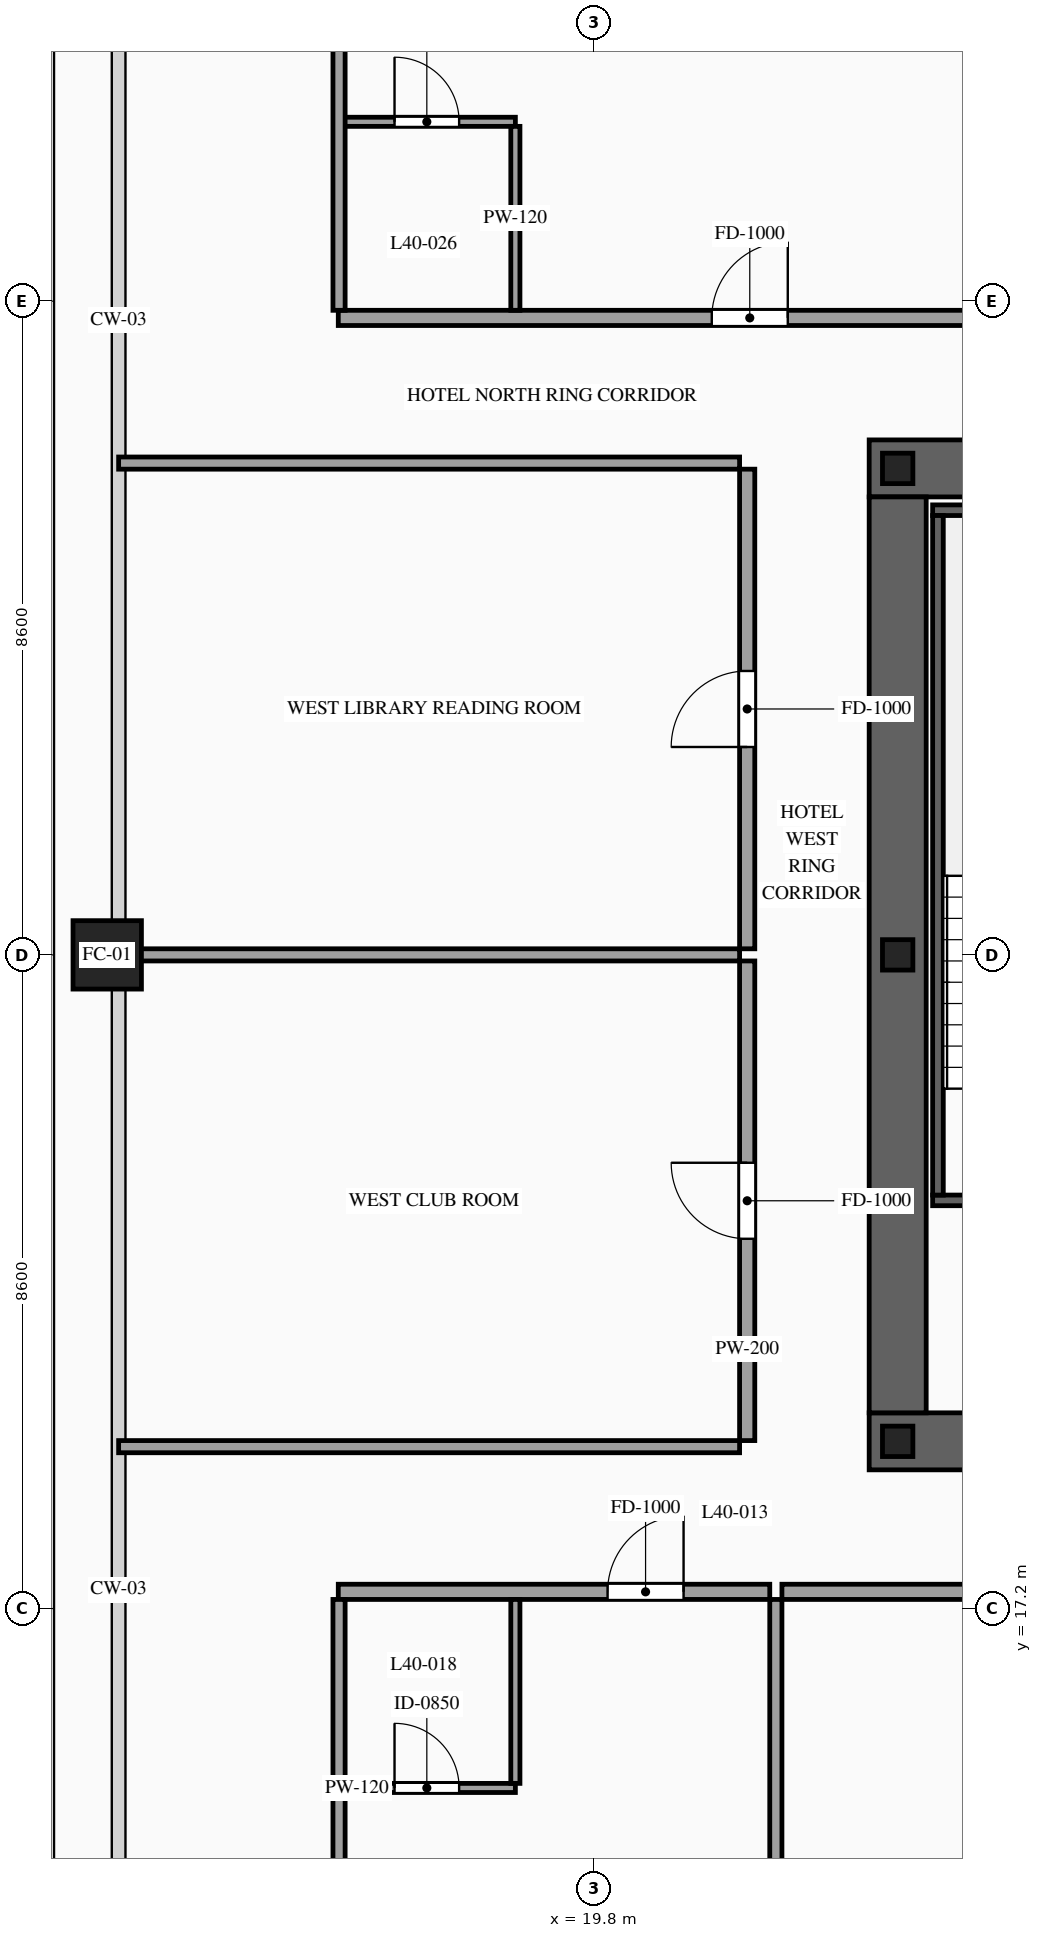
"""IFC4 building model, lengths in metres.
Left out: names, types, materials, properties, quantities, classifications, styles, units other than length and angle.
Written with IfcOpenShell. Run it as: python <this file> out.ifc"""

import sys

from ifc_helpers import new_model, si_unit, direction, frame, frame_2d, origin, origin_2d, place, context, subcontext, project, spatial, rectangle, hollow_rectangle, i_section, extrude, source, transform, mapped, element, fill, save


model = new_model("IFC4")
c1 = context("Model", 3, precision=1e-05, world=origin(), true_north=direction((0.0, 1.0)))
c2 = subcontext(c1, "Body", "Model", "MODEL_VIEW")
j1 = project(units=[si_unit("LENGTHUNIT", "METRE"), si_unit("PLANEANGLEUNIT", "RADIAN")], contexts=[c1])
p1 = place(None, origin())
s1 = spatial("IfcSite", under=j1, at=p1, CompositionType="ELEMENT")
p2 = place(p1, origin())
s2 = spatial("IfcBuilding", under=s1, at=p2, CompositionType="ELEMENT")
p3 = place(p2, frame((0.0, 0.0, 152.4)))
s3 = spatial("IfcBuildingStorey", under=s2, at=p3, CompositionType="ELEMENT", Elevation=152.4)
p4 = place(p3, frame((23.425, 19.4, 0.0), z_axis=(0.0, 0.0, 1.0), x_axis=(1.0, 0.0, 0.0)))
e1 = element("IfcWall", 1, at=p4, inside=s3, PredefinedType="SHEAR", context=c2, shape_type="SweptSolid", body=[
    extrude(rectangle(XDim=27.15, YDim=0.75, at=frame_2d((13.575, 0.0))), origin(), (0.0, 0.0, 1.0), 3.6),
])
p5 = place(p4, frame((2.025, 0.0, 0.0)))
e2 = element("IfcOpeningElement", 2, at=p5, cuts=e1, PredefinedType="OPENING", context=c2, shape_type="SweptSolid", body=[
    extrude(rectangle(XDim=1.1, YDim=2.2, at=frame_2d((0.55, 1.1))), frame((0.0, 0.39, 0.0), z_axis=(0.0, -1.0, 0.0), x_axis=(1.0, 0.0, 0.0)), (0.0, 0.0, 1.0), 0.78),
])
p6 = place(p4, frame((9.925, 0.0, 0.0)))
e3 = element("IfcOpeningElement", 3, at=p6, cuts=e1, PredefinedType="OPENING", context=c2, shape_type="SweptSolid", body=[
    extrude(rectangle(XDim=1.1, YDim=2.2, at=frame_2d((0.55, 1.1))), frame((0.0, 0.39, 0.0), z_axis=(0.0, -1.0, 0.0), x_axis=(1.0, 0.0, 0.0)), (0.0, 0.0, 1.0), 0.78),
])
p7 = place(p4, frame((23.125, 0.0, 0.0)))
e4 = element("IfcOpeningElement", 4, at=p7, cuts=e1, PredefinedType="OPENING", context=c2, shape_type="SweptSolid", body=[
    extrude(rectangle(XDim=1.1, YDim=2.2, at=frame_2d((0.55, 1.1))), frame((0.0, 0.39, 0.0), z_axis=(0.0, -1.0, 0.0), x_axis=(1.0, 0.0, 0.0)), (0.0, 0.0, 1.0), 0.78),
])
p8 = place(p4, frame((19.745, 0.0, 0.0)))
e5 = element("IfcOpeningElement", 5, at=p8, cuts=e1, PredefinedType="OPENING", context=c2, shape_type="SweptSolid", body=[
    extrude(rectangle(XDim=0.9, YDim=2.15, at=frame_2d((0.45, 1.075))), frame((0.0, 0.39, 0.0), z_axis=(0.0, -1.0, 0.0), x_axis=(1.0, 0.0, 0.0)), (0.0, 0.0, 1.0), 0.78),
])
p9 = place(p4, frame((18.305, 0.0, 0.0)))
e6 = element("IfcOpeningElement", 6, at=p9, cuts=e1, PredefinedType="OPENING", context=c2, shape_type="SweptSolid", body=[
    extrude(rectangle(XDim=0.9, YDim=2.15, at=frame_2d((0.45, 1.075))), frame((0.0, 0.39, 0.0), z_axis=(0.0, -1.0, 0.0), x_axis=(1.0, 0.0, 0.0)), (0.0, 0.0, 1.0), 0.78),
])
p10 = place(p3, frame((23.425, 32.2, 0.0), z_axis=(0.0, 0.0, 1.0), x_axis=(1.0, 0.0, 0.0)))
e7 = element("IfcWall", 7, at=p10, inside=s3, PredefinedType="SHEAR", context=c2, shape_type="SweptSolid", body=[
    extrude(rectangle(XDim=27.15, YDim=0.75, at=frame_2d((13.575, 0.0))), origin(), (0.0, 0.0, 1.0), 3.6),
])
p11 = place(p10, frame((4.645, 0.0, 0.0)))
e8 = element("IfcOpeningElement", 8, at=p11, cuts=e7, PredefinedType="OPENING", context=c2, shape_type="SweptSolid", body=[
    extrude(rectangle(XDim=0.9, YDim=2.15, at=frame_2d((0.45, 1.075))), frame((0.0, 0.39, 0.0), z_axis=(0.0, -1.0, 0.0), x_axis=(1.0, 0.0, 0.0)), (0.0, 0.0, 1.0), 0.78),
])
p12 = place(p10, frame((9.925, 0.0, 0.0)))
e9 = element("IfcOpeningElement", 9, at=p12, cuts=e7, PredefinedType="OPENING", context=c2, shape_type="SweptSolid", body=[
    extrude(rectangle(XDim=1.1, YDim=2.2, at=frame_2d((0.55, 1.1))), frame((0.0, 0.39, 0.0), z_axis=(0.0, -1.0, 0.0), x_axis=(1.0, 0.0, 0.0)), (0.0, 0.0, 1.0), 0.78),
])
p13 = place(p10, frame((15.775, 0.0, 0.0)))
e10 = element("IfcOpeningElement", 10, at=p13, cuts=e7, PredefinedType="OPENING", context=c2, shape_type="SweptSolid", body=[
    extrude(rectangle(XDim=1.1, YDim=2.2, at=frame_2d((0.55, 1.1))), frame((0.0, 0.39, 0.0), z_axis=(0.0, -1.0, 0.0), x_axis=(1.0, 0.0, 0.0)), (0.0, 0.0, 1.0), 0.78),
])
p14 = place(p10, frame((19.745, 0.0, 0.0)))
e11 = element("IfcOpeningElement", 11, at=p14, cuts=e7, PredefinedType="OPENING", context=c2, shape_type="SweptSolid", body=[
    extrude(rectangle(XDim=0.9, YDim=2.15, at=frame_2d((0.45, 1.075))), frame((0.0, 0.39, 0.0), z_axis=(0.0, -1.0, 0.0), x_axis=(1.0, 0.0, 0.0)), (0.0, 0.0, 1.0), 0.78),
])
m1 = source(origin(), c2, "Body", "SweptSolid", [
    extrude(rectangle(XDim=12.05, YDim=0.75, at=frame_2d((6.025, 0.0))), origin(), (0.0, 0.0, 1.0), 3.6),
])
p15 = place(p3, frame((23.8, 19.775, 0.0), z_axis=(0.0, 0.0, 1.0), x_axis=(0.0, 1.0, 0.0)))
e12 = element("IfcWall", 12, at=p15, inside=s3, PredefinedType="SHEAR", context=c2, shape_type="MappedRepresentation", body=[
    mapped(m1, transform((0.0, 0.0, 0.0), scale=1.0)),
])
m2 = source(origin(), c2, "Body", "SweptSolid", [
    extrude(i_section(OverallWidth=0.4, OverallDepth=0.4, WebThickness=0.013, FlangeThickness=0.021, at=origin_2d()), origin(), (0.0, 0.0, 1.0), 3.6),
])
for number, where, z_axis, x_axis in (
    (13, (23.8, 19.4, 0.0), (0.0, 0.0, 1.0), (1.0, 0.0, 0.0)),
    (14, (23.8, 25.8, 0.0), (0.0, 0.0, 1.0), (1.0, 0.0, 0.0)),
    (15, (23.8, 32.2, 0.0), (0.0, 0.0, 1.0), (1.0, 0.0, 0.0)),
):
    element("IfcColumn", number, at=place(p3, frame(where, z_axis=z_axis, x_axis=x_axis)), inside=s3, PredefinedType="COLUMN", context=c2, shape_type="MappedRepresentation", body=[
        mapped(m2, transform((0.0, 0.0, 0.0), scale=1.0)),
    ])
m3 = source(origin(), c2, "Body", "SweptSolid", [
    extrude(hollow_rectangle(XDim=0.9, YDim=0.9, WallThickness=0.042, at=origin_2d()), origin(), (0.0, 0.0, 1.0), 3.6),
])
p16 = place(p3, frame((13.4, 25.8, 0.0), z_axis=(0.0, 0.0, 1.0), x_axis=(1.0, 0.0, 0.0)))
e16 = element("IfcColumn", 16, at=p16, inside=s3, PredefinedType="COLUMN", context=c2, shape_type="MappedRepresentation", body=[
    mapped(m3, transform((0.0, 0.0, 0.0), scale=1.0)),
])
p17 = place(p3, frame((24.26, 22.57, 0.0), z_axis=(0.0, 0.0, 1.0), x_axis=(1.0, 0.0, 0.0)))
e17 = element("IfcWall", 17, at=p17, inside=s3, PredefinedType="SOLIDWALL", context=c2, shape_type="SweptSolid", body=[
    extrude(rectangle(XDim=3.28, YDim=0.14, at=frame_2d((1.64, 0.0))), origin(), (0.0, 0.0, 1.0), 3.38),
])
p18 = place(p17, frame((1.09, 0.0, 0.0)))
e18 = element("IfcOpeningElement", 18, at=p18, cuts=e17, PredefinedType="OPENING", context=c2, shape_type="SweptSolid", body=[
    extrude(rectangle(XDim=1.1, YDim=2.2, at=frame_2d((0.55, 1.1))), frame((0.0, 0.085, 0.0), z_axis=(0.0, -1.0, 0.0), x_axis=(1.0, 0.0, 0.0)), (0.0, 0.0, 1.0), 0.17),
])
m4 = source(origin(), c2, "Body", "SweptSolid", [
    extrude(rectangle(XDim=3.28, YDim=0.14, at=frame_2d((1.64, 0.0))), origin(), (0.0, 0.0, 1.0), 3.38),
])
p19 = place(p3, frame((24.26, 31.65, 0.0), z_axis=(0.0, 0.0, 1.0), x_axis=(1.0, 0.0, 0.0)))
e19 = element("IfcWall", 19, at=p19, inside=s3, PredefinedType="SOLIDWALL", context=c2, shape_type="MappedRepresentation", body=[
    mapped(m4, transform((0.0, 0.0, 0.0), scale=1.0)),
])
m5 = source(origin(), c2, "Body", "SweptSolid", [
    extrude(rectangle(XDim=8.94, YDim=0.14, at=frame_2d((4.47, 0.0))), origin(), (0.0, 0.0, 1.0), 3.38),
])
p20 = place(p3, frame((24.33, 22.64, 0.0), z_axis=(0.0, 0.0, 1.0), x_axis=(0.0, 1.0, 0.0)))
e20 = element("IfcWall", 20, at=p20, inside=s3, PredefinedType="SOLIDWALL", context=c2, shape_type="MappedRepresentation", body=[
    mapped(m5, transform((0.0, 0.0, 0.0), scale=1.0)),
])
p21 = place(p3, frame((16.44, 17.42, 0.0), z_axis=(0.0, 0.0, 1.0), x_axis=(1.0, 0.0, 0.0)))
e21 = element("IfcWall", 21, at=p21, inside=s3, PredefinedType="PARTITIONING", context=c2, shape_type="SweptSolid", body=[
    extrude(rectangle(XDim=5.677, YDim=0.2, at=frame_2d((2.838, 0.0))), origin(), (0.0, 0.0, 1.0), 3.38),
])
p22 = place(p21, frame((3.543, 0.0, 0.0)))
e22 = element("IfcOpeningElement", 22, at=p22, cuts=e21, PredefinedType="OPENING", context=c2, shape_type="SweptSolid", body=[
    extrude(rectangle(XDim=1.0, YDim=2.2, at=frame_2d((0.5, 1.1))), frame((0.0, 0.115, 0.0), z_axis=(0.0, -1.0, 0.0), x_axis=(1.0, 0.0, 0.0)), (0.0, 0.0, 1.0), 0.23),
])
m6 = source(origin(), c2, "Body", "SweptSolid", [
    extrude(rectangle(XDim=14.97, YDim=0.16, at=frame_2d((7.485, 0.0))), origin(), (0.0, 0.0, 1.0), 3.38),
])
p23 = place(p3, frame((22.197, 2.35, 0.0), z_axis=(0.0, 0.0, 1.0), x_axis=(0.0, 1.0, 0.0)))
e23 = element("IfcWall", 23, at=p23, inside=s3, PredefinedType="PARTITIONING", context=c2, shape_type="MappedRepresentation", body=[
    mapped(m6, transform((0.0, 0.0, 0.0), scale=1.0)),
])
p24 = place(p3, frame((16.44, 14.84, 0.0), z_axis=(0.0, 0.0, 1.0), x_axis=(1.0, 0.0, 0.0)))
e24 = element("IfcWall", 24, at=p24, inside=s3, PredefinedType="PARTITIONING", context=c2, shape_type="SweptSolid", body=[
    extrude(rectangle(XDim=2.33, YDim=0.12, at=frame_2d((1.165, 0.0))), origin(), (0.0, 0.0, 1.0), 3.38),
])
p25 = place(p24, frame((0.74, 0.0, 0.0)))
e25 = element("IfcOpeningElement", 25, at=p25, cuts=e24, PredefinedType="OPENING", context=c2, shape_type="SweptSolid", body=[
    extrude(rectangle(XDim=0.85, YDim=2.1, at=frame_2d((0.425, 1.05))), frame((0.0, 0.075, 0.0), z_axis=(0.0, -1.0, 0.0), x_axis=(1.0, 0.0, 0.0)), (0.0, 0.0, 1.0), 0.15),
])
m7 = source(origin(), c2, "Body", "SweptSolid", [
    extrude(rectangle(XDim=2.42, YDim=0.12, at=frame_2d((1.21, 0.0))), origin(), (0.0, 0.0, 1.0), 3.38),
])
p26 = place(p3, frame((18.77, 14.9, 0.0), z_axis=(0.0, 0.0, 1.0), x_axis=(0.0, 1.0, 0.0)))
e26 = element("IfcWall", 26, at=p26, inside=s3, PredefinedType="PARTITIONING", context=c2, shape_type="MappedRepresentation", body=[
    mapped(m7, transform((0.0, 0.0, 0.0), scale=1.0)),
])
p27 = place(p3, frame((22.277, 17.42, 0.0), z_axis=(0.0, 0.0, 1.0), x_axis=(1.0, 0.0, 0.0)))
e27 = element("IfcWall", 27, at=p27, inside=s3, PredefinedType="PARTITIONING", context=c2, shape_type="SweptSolid", body=[
    extrude(rectangle(XDim=8.777, YDim=0.2, at=frame_2d((4.388, 0.0))), origin(), (0.0, 0.0, 1.0), 3.38),
])
p28 = place(p27, frame((3.889, 0.0, 0.0)))
e28 = element("IfcOpeningElement", 28, at=p28, cuts=e27, PredefinedType="OPENING", context=c2, shape_type="SweptSolid", body=[
    extrude(rectangle(XDim=1.0, YDim=2.2, at=frame_2d((0.5, 1.1))), frame((0.0, 0.115, 0.0), z_axis=(0.0, -1.0, 0.0), x_axis=(1.0, 0.0, 0.0)), (0.0, 0.0, 1.0), 0.23),
])
m8 = source(origin(), c2, "Body", "SweptSolid", [
    extrude(rectangle(XDim=14.82, YDim=0.16, at=frame_2d((7.41, 0.0))), origin(), (0.0, 0.0, 1.0), 3.38),
])
p29 = place(p3, frame((16.45, 2.5, 0.0), z_axis=(0.0, 0.0, 1.0), x_axis=(0.0, 1.0, 0.0)))
e29 = element("IfcWall", 29, at=p29, inside=s3, PredefinedType="PARTITIONING", context=c2, shape_type="MappedRepresentation", body=[
    mapped(m8, transform((0.0, 0.0, 0.0), scale=1.0)),
])
p30 = place(p3, frame((16.44, 34.18, 0.0), z_axis=(0.0, 0.0, 1.0), x_axis=(1.0, 0.0, 0.0)))
e30 = element("IfcWall", 30, at=p30, inside=s3, PredefinedType="PARTITIONING", context=c2, shape_type="SweptSolid", body=[
    extrude(rectangle(XDim=8.418, YDim=0.2, at=frame_2d((4.209, 0.0))), origin(), (0.0, 0.0, 1.0), 3.38),
])
p31 = place(p30, frame((4.914, 0.0, 0.0)))
e31 = element("IfcOpeningElement", 31, at=p31, cuts=e30, PredefinedType="OPENING", context=c2, shape_type="SweptSolid", body=[
    extrude(rectangle(XDim=1.0, YDim=2.2, at=frame_2d((0.5, 1.1))), frame((0.0, 0.115, 0.0), z_axis=(0.0, -1.0, 0.0), x_axis=(1.0, 0.0, 0.0)), (0.0, 0.0, 1.0), 0.23),
])
p32 = place(p3, frame((16.44, 36.76, 0.0), z_axis=(0.0, 0.0, 1.0), x_axis=(1.0, 0.0, 0.0)))
e32 = element("IfcWall", 32, at=p32, inside=s3, PredefinedType="PARTITIONING", context=c2, shape_type="SweptSolid", body=[
    extrude(rectangle(XDim=2.33, YDim=0.12, at=frame_2d((1.165, 0.0))), origin(), (0.0, 0.0, 1.0), 3.38),
])
p33 = place(p32, frame((0.74, 0.0, 0.0)))
e33 = element("IfcOpeningElement", 33, at=p33, cuts=e32, PredefinedType="OPENING", context=c2, shape_type="SweptSolid", body=[
    extrude(rectangle(XDim=0.85, YDim=2.1, at=frame_2d((0.425, 1.05))), frame((0.0, 0.075, 0.0), z_axis=(0.0, -1.0, 0.0), x_axis=(1.0, 0.0, 0.0)), (0.0, 0.0, 1.0), 0.15),
])
m9 = source(origin(), c2, "Body", "SweptSolid", [
    extrude(rectangle(XDim=2.42, YDim=0.12, at=frame_2d((1.21, 0.0))), origin(), (0.0, 0.0, 1.0), 3.38),
])
p34 = place(p3, frame((18.77, 34.28, 0.0), z_axis=(0.0, 0.0, 1.0), x_axis=(0.0, 1.0, 0.0)))
e34 = element("IfcWall", 34, at=p34, inside=s3, PredefinedType="PARTITIONING", context=c2, shape_type="MappedRepresentation", body=[
    mapped(m9, transform((0.0, 0.0, 0.0), scale=1.0)),
])
p35 = place(p3, frame((16.45, 34.28, 0.0), z_axis=(0.0, 0.0, 1.0), x_axis=(0.0, 1.0, 0.0)))
e35 = element("IfcWall", 35, at=p35, inside=s3, PredefinedType="PARTITIONING", context=c2, shape_type="MappedRepresentation", body=[
    mapped(m8, transform((0.0, 0.0, 0.0), scale=1.0)),
])
p36 = place(p3, frame((21.82, 19.41, 0.0), z_axis=(0.0, 0.0, 1.0), x_axis=(0.0, 1.0, 0.0)))
e36 = element("IfcWall", 36, at=p36, inside=s3, PredefinedType="PARTITIONING", context=c2, shape_type="SweptSolid", body=[
    extrude(rectangle(XDim=6.31, YDim=0.2, at=frame_2d((3.155, 0.0))), origin(), (0.0, 0.0, 1.0), 3.38),
])
p37 = place(p36, frame((2.655, 0.0, 0.0)))
e37 = element("IfcOpeningElement", 37, at=p37, cuts=e36, PredefinedType="OPENING", context=c2, shape_type="SweptSolid", body=[
    extrude(rectangle(XDim=1.0, YDim=2.2, at=frame_2d((0.5, 1.1))), frame((0.0, 0.115, 0.0), z_axis=(0.0, -1.0, 0.0), x_axis=(1.0, 0.0, 0.0)), (0.0, 0.0, 1.0), 0.23),
])
m10 = source(origin(), c2, "Body", "SweptSolid", [
    extrude(rectangle(XDim=8.17, YDim=0.16, at=frame_2d((4.085, 0.0))), origin(), (0.0, 0.0, 1.0), 2.675),
])
p38 = place(p3, frame((13.55, 25.8, 0.0), z_axis=(0.0, 0.0, 1.0), x_axis=(1.0, 0.0, 0.0)))
e38 = element("IfcWall", 38, at=p38, inside=s3, PredefinedType="PARTITIONING", context=c2, shape_type="MappedRepresentation", body=[
    mapped(m10, transform((0.0, 0.0, 0.0), scale=1.0)),
])
m11 = source(origin(), c2, "Body", "SweptSolid", [
    extrude(rectangle(XDim=8.17, YDim=0.16, at=frame_2d((4.085, 0.0))), origin(), (0.0, 0.0, 1.0), 2.875),
])
p39 = place(p3, frame((13.55, 19.33, 0.0), z_axis=(0.0, 0.0, 1.0), x_axis=(1.0, 0.0, 0.0)))
e39 = element("IfcWall", 39, at=p39, inside=s3, PredefinedType="PARTITIONING", context=c2, shape_type="MappedRepresentation", body=[
    mapped(m11, transform((0.0, 0.0, 0.0), scale=1.0)),
])
p40 = place(p3, frame((21.82, 25.88, 0.0), z_axis=(0.0, 0.0, 1.0), x_axis=(0.0, 1.0, 0.0)))
e40 = element("IfcWall", 40, at=p40, inside=s3, PredefinedType="PARTITIONING", context=c2, shape_type="SweptSolid", body=[
    extrude(rectangle(XDim=6.31, YDim=0.2, at=frame_2d((3.155, 0.0))), origin(), (0.0, 0.0, 1.0), 3.38),
])
p41 = place(p40, frame((2.655, 0.0, 0.0)))
e41 = element("IfcOpeningElement", 41, at=p41, cuts=e40, PredefinedType="OPENING", context=c2, shape_type="SweptSolid", body=[
    extrude(rectangle(XDim=1.0, YDim=2.2, at=frame_2d((0.5, 1.1))), frame((0.0, 0.115, 0.0), z_axis=(0.0, -1.0, 0.0), x_axis=(1.0, 0.0, 0.0)), (0.0, 0.0, 1.0), 0.23),
])
p42 = place(p3, frame((13.55, 32.27, 0.0), z_axis=(0.0, 0.0, 1.0), x_axis=(1.0, 0.0, 0.0)))
e42 = element("IfcWall", 42, at=p42, inside=s3, PredefinedType="PARTITIONING", context=c2, shape_type="MappedRepresentation", body=[
    mapped(m11, transform((0.0, 0.0, 0.0), scale=1.0)),
])
m12 = source(origin(), c2, "Body", "SweptSolid", [
    extrude(rectangle(XDim=1.0, YDim=2.2, at=frame_2d((0.5, 1.1))), frame((0.0, 0.025, 0.0), z_axis=(0.0, -1.0, 0.0), x_axis=(1.0, 0.0, 0.0)), (0.0, 0.0, 1.0), 0.05),
])
p43 = place(p22, origin())
e43 = element("IfcDoor", 43, at=p43, inside=s3, OperationType="SINGLE_SWING_RIGHT", PredefinedType="DOOR", context=c2, shape_type="MappedRepresentation", body=[
    mapped(m12, transform((0.0, 0.0, 0.0), scale=1.0)),
])
fill(e22, e43)
m13 = source(origin(), c2, "Body", "SweptSolid", [
    extrude(rectangle(XDim=0.85, YDim=2.1, at=frame_2d((0.425, 1.05))), frame((0.0, 0.025, 0.0), z_axis=(0.0, -1.0, 0.0), x_axis=(1.0, 0.0, 0.0)), (0.0, 0.0, 1.0), 0.05),
])
p44 = place(p25, origin())
e44 = element("IfcDoor", 44, at=p44, inside=s3, OperationType="SINGLE_SWING_LEFT", PredefinedType="DOOR", context=c2, shape_type="MappedRepresentation", body=[
    mapped(m13, transform((0.0, 0.0, 0.0), scale=1.0)),
])
fill(e25, e44)
p45 = place(p31, origin())
e45 = element("IfcDoor", 45, at=p45, inside=s3, OperationType="SINGLE_SWING_RIGHT", PredefinedType="DOOR", context=c2, shape_type="MappedRepresentation", body=[
    mapped(m12, transform((0.0, 0.0, 0.0), scale=1.0)),
])
fill(e31, e45)
p46 = place(p33, origin())
e46 = element("IfcDoor", 46, at=p46, inside=s3, OperationType="SINGLE_SWING_LEFT", PredefinedType="DOOR", context=c2, shape_type="MappedRepresentation", body=[
    mapped(m13, transform((0.0, 0.0, 0.0), scale=1.0)),
])
fill(e33, e46)
p47 = place(p37, origin())
e47 = element("IfcDoor", 47, at=p47, inside=s3, OperationType="SINGLE_SWING_RIGHT", PredefinedType="DOOR", context=c2, shape_type="MappedRepresentation", body=[
    mapped(m12, transform((0.0, 0.0, 0.0), scale=1.0)),
])
fill(e37, e47)
p48 = place(p41, origin())
e48 = element("IfcDoor", 48, at=p48, inside=s3, OperationType="SINGLE_SWING_LEFT", PredefinedType="DOOR", context=c2, shape_type="MappedRepresentation", body=[
    mapped(m12, transform((0.0, 0.0, 0.0), scale=1.0)),
])
fill(e41, e48)
save(model, sys.argv[1])
